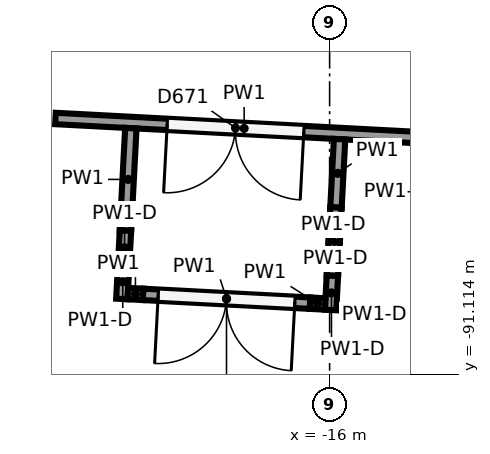
"""IFC4 building model, lengths in metres.
Left out: names, types, materials, properties, quantities, classifications, styles, units other than length and angle.
Written with IfcOpenShell. Run it as: python <this file> out.ifc"""

import sys

from ifc_helpers import new_model, si_unit, direction, frame, frame_2d, origin, place, context, subcontext, project, spatial, rectangle, extrude, element, fill, save


model = new_model("IFC4")
c1 = context("Model", 3, precision=1e-05, world=origin(), true_north=direction((0.0, 1.0)))
c2 = subcontext(c1, "Body", "Model", "MODEL_VIEW")
j1 = project(units=[si_unit("LENGTHUNIT", "METRE"), si_unit("PLANEANGLEUNIT", "RADIAN")], contexts=[c1])
p1 = place(None, origin())
s1 = spatial("IfcSite", under=j1, at=p1, CompositionType="ELEMENT")
p2 = place(p1, origin())
s2 = spatial("IfcBuilding", under=s1, at=p2, CompositionType="ELEMENT")
p3 = place(p2, frame((0.0, 0.0, 6.5)))
s3 = spatial("IfcBuildingStorey", under=s2, at=p3, CompositionType="ELEMENT", Elevation=6.5)
p4 = place(p3, frame((-14.642, -88.012, 0.0), z_axis=(0.0, 0.0, 1.0), x_axis=(-0.998613893233, 0.052633565738, 0.0)))
e1 = element("IfcWall", 1, at=p4, inside=s3, PredefinedType="PARTITIONING", context=c2, shape_type="SweptSolid", body=[
    extrude(rectangle(XDim=4.972, YDim=0.15, at=frame_2d((2.486, 0.0))), origin(), (0.0, 0.0, 1.0), 5.15),
])
p5 = place(p4, frame((1.7, 0.0, 0.0)))
e2 = element("IfcOpeningElement", 2, at=p5, cuts=e1, PredefinedType="OPENING", context=c2, shape_type="SweptSolid", body=[
    extrude(rectangle(XDim=1.8, YDim=2.1, at=frame_2d((0.9, 1.05))), frame((0.0, 0.085, 0.0), z_axis=(0.0, -1.0, 0.0), x_axis=(1.0, 0.0, 0.0)), (0.0, 0.0, 1.0), 0.17),
])
p6 = place(p3, frame((-15.869, -88.022, 0.0), z_axis=(0.0, 0.0, 1.0), x_axis=(-0.052630027564, -0.998614079712, 0.0)))
e3 = element("IfcWall", 3, at=p6, inside=s3, PredefinedType="PARTITIONING", context=c2, shape_type="SweptSolid", body=[
    extrude(rectangle(XDim=0.9, YDim=0.15, at=frame_2d((0.45, 0.0))), origin(), (0.0, 0.0, 1.0), 5.15),
])
p7 = place(p3, frame((-15.916, -88.921, 0.0), z_axis=(0.0, 0.0, 1.0), x_axis=(-0.052615773272, -0.998614830855, 0.0)))
e4 = element("IfcWall", 4, at=p7, inside=s3, PredefinedType="PARTITIONING", context=c2, shape_type="SweptSolid", body=[
    extrude(rectangle(XDim=0.45, YDim=0.15, at=frame_2d((0.225, 0.0))), origin(), (0.0, 0.0, 1.0), 3.85),
])
p8 = place(p3, frame((-15.94, -89.37, 0.0), z_axis=(0.0, 0.0, 1.0), x_axis=(-0.052644289572, -0.998613327958, 0.0)))
e5 = element("IfcWall", 5, at=p8, inside=s3, PredefinedType="PARTITIONING", context=c2, shape_type="SweptSolid", body=[
    extrude(rectangle(XDim=0.45, YDim=0.15, at=frame_2d((0.225, 0.0))), origin(), (0.0, 0.0, 1.0), 3.85),
])
p9 = place(p3, frame((-15.964, -89.82, 0.0), z_axis=(0.0, 0.0, 1.0), x_axis=(-0.052615773272, -0.998614830855, 0.0)))
e6 = element("IfcWall", 6, at=p9, inside=s3, PredefinedType="PARTITIONING", context=c2, shape_type="SweptSolid", body=[
    extrude(rectangle(XDim=0.45, YDim=0.15, at=frame_2d((0.225, 0.0))), origin(), (0.0, 0.0, 1.0), 3.85),
])
p10 = place(p3, frame((-18.615, -87.877, 0.0), z_axis=(0.0, 0.0, 1.0), x_axis=(-0.05280561474, -0.998604810249, 0.0)))
e7 = element("IfcWall", 7, at=p10, inside=s3, PredefinedType="PARTITIONING", context=c2, shape_type="SweptSolid", body=[
    extrude(rectangle(XDim=1.35, YDim=0.15, at=frame_2d((0.675, 0.0))), origin(), (0.0, 0.0, 1.0), 5.15),
])
p11 = place(p3, frame((-18.686, -89.226, 0.0), z_axis=(0.0, 0.0, 1.0), x_axis=(-0.052644289572, -0.998613327958, 0.0)))
e8 = element("IfcWall", 8, at=p11, inside=s3, PredefinedType="PARTITIONING", context=c2, shape_type="SweptSolid", body=[
    extrude(rectangle(XDim=0.45, YDim=0.15, at=frame_2d((0.225, 0.0))), origin(), (0.0, 0.0, 1.0), 3.85),
])
p12 = place(p3, frame((-18.71, -89.675, 0.0), z_axis=(0.0, 0.0, 1.0), x_axis=(-0.052615773272, -0.998614830855, 0.0)))
e9 = element("IfcWall", 9, at=p12, inside=s3, PredefinedType="PARTITIONING", context=c2, shape_type="SweptSolid", body=[
    extrude(rectangle(XDim=0.45, YDim=0.15, at=frame_2d((0.225, 0.0))), origin(), (0.0, 0.0, 1.0), 3.85),
])
p13 = place(p3, frame((-16.058, -90.19, 0.0), z_axis=(0.0, 0.0, 1.0), x_axis=(-0.998621199675, 0.05249475744, 0.0)))
e10 = element("IfcWall", 10, at=p13, inside=s3, PredefinedType="PARTITIONING", context=c2, shape_type="SweptSolid", body=[
    extrude(rectangle(XDim=0.2, YDim=0.15, at=frame_2d((0.1, 0.0))), origin(), (0.0, 0.0, 1.0), 5.15),
])
p14 = place(p3, frame((-16.258, -90.18, 0.0), z_axis=(0.0, 0.0, 1.0), x_axis=(-0.998615682679, 0.052599603688, 0.0)))
e11 = element("IfcWall", 11, at=p14, inside=s3, PredefinedType="PARTITIONING", context=c2, shape_type="SweptSolid", body=[
    extrude(rectangle(XDim=2.2, YDim=0.15, at=frame_2d((1.1, 0.0))), origin(), (0.0, 0.0, 1.0), 5.15),
])
p15 = place(p14, frame((0.2, 0.0, 0.0)))
e12 = element("IfcOpeningElement", 12, at=p15, cuts=e11, PredefinedType="OPENING", context=c2, shape_type="SweptSolid", body=[
    extrude(rectangle(XDim=1.8, YDim=2.1, at=frame_2d((0.9, 1.05))), frame((0.0, 0.085, 0.0), z_axis=(0.0, -1.0, 0.0), x_axis=(1.0, 0.0, 0.0)), (0.0, 0.0, 1.0), 0.17),
])
p16 = place(p3, frame((-18.455, -90.064, 0.0), z_axis=(0.0, 0.0, 1.0), x_axis=(-0.998556464137, 0.053712083646, 0.0)))
e13 = element("IfcWall", 13, at=p16, inside=s3, PredefinedType="PARTITIONING", context=c2, shape_type="SweptSolid", body=[
    extrude(rectangle(XDim=0.2, YDim=0.15, at=frame_2d((0.1, 0.0))), origin(), (0.0, 0.0, 1.0), 5.15),
])
p17 = place(p5, origin())
e14 = element("IfcDoor", 14, at=p17, inside=s3, OperationType="DOUBLE_DOOR_SINGLE_SWING", PredefinedType="DOOR", context=c2, shape_type="SweptSolid", body=[
    extrude(rectangle(XDim=1.8, YDim=2.1, at=frame_2d((0.9, 1.05))), frame((0.0, 0.025, 0.0), z_axis=(0.0, -1.0, 0.0), x_axis=(1.0, 0.0, 0.0)), (0.0, 0.0, 1.0), 0.05),
])
fill(e2, e14)
p18 = place(p15, origin())
e15 = element("IfcDoor", 15, at=p18, inside=s3, OperationType="DOUBLE_DOOR_SINGLE_SWING", PredefinedType="DOOR", context=c2, shape_type="SweptSolid", body=[
    extrude(rectangle(XDim=1.8, YDim=2.1, at=frame_2d((0.9, 1.05))), frame((0.0, 0.025, 0.0), z_axis=(0.0, -1.0, 0.0), x_axis=(1.0, 0.0, 0.0)), (0.0, 0.0, 1.0), 0.05),
])
fill(e12, e15)
save(model, sys.argv[1])
